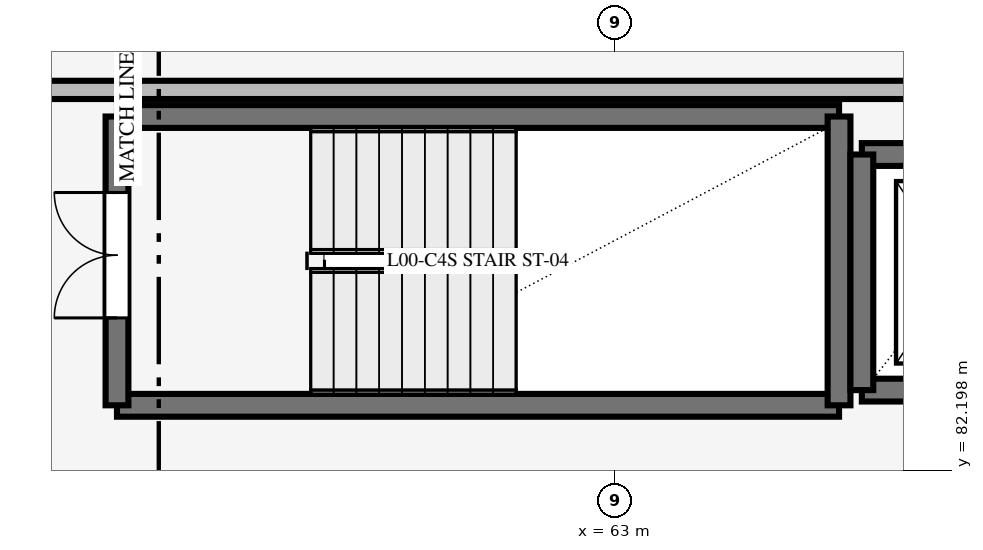
"""IFC4 building model, lengths in metres.
Left out: names, types, materials, properties, quantities, classifications, styles, units other than length and angle.
Written with IfcOpenShell. Run it as: python <this file> out.ifc"""

import sys

from ifc_helpers import new_model, si_unit, direction, frame, frame_2d, origin, place, context, subcontext, project, spatial, rectangle, extrude, element, fill, save


model = new_model("IFC4")
c1 = context("Model", 3, precision=1e-05, world=origin(), true_north=direction((0.0, 1.0)))
c2 = subcontext(c1, "Body", "Model", "MODEL_VIEW")
j1 = project(units=[si_unit("LENGTHUNIT", "METRE"), si_unit("PLANEANGLEUNIT", "RADIAN")], contexts=[c1])
p1 = place(None, origin())
s1 = spatial("IfcSite", under=j1, at=p1, CompositionType="ELEMENT")
p2 = place(p1, origin())
s2 = spatial("IfcBuilding", under=s1, at=p2, CompositionType="ELEMENT")
p3 = place(p2, origin())
s3 = spatial("IfcBuildingStorey", under=s2, at=p3, CompositionType="ELEMENT", Elevation=0.0)
for number, where, z_axis, x_axis in (
    (1, (65.95, 83.05, 0.0), (0.0, 0.0, 1.0), (-1.0, 0.0, 0.0)),
    (2, (56.45, 86.85, 0.0), (0.0, 0.0, 1.0), (1.0, 0.0, 0.0)),
):
    element("IfcWall", number, at=place(p3, frame(where, z_axis=z_axis, x_axis=x_axis)), inside=s3, PredefinedType="SHEAR", context=c2, shape_type="SweptSolid", body=[
        extrude(rectangle(XDim=9.5, YDim=0.3, at=frame_2d((4.75, 0.0))), origin(), (0.0, 0.0, 1.0), 6.0),
    ])
p4 = place(p3, frame((56.45, 83.05, 0.0), z_axis=(0.0, 0.0, 1.0), x_axis=(0.0, 1.0, 0.0)))
e3 = element("IfcWall", 3, at=p4, inside=s3, PredefinedType="SHEAR", context=c2, shape_type="SweptSolid", body=[
    extrude(rectangle(XDim=3.8, YDim=0.3, at=frame_2d((1.9, 0.0))), origin(), (0.0, 0.0, 1.0), 6.0),
])
p5 = place(p4, frame((1.15, 0.0, 0.0)))
e4 = element("IfcOpeningElement", 4, at=p5, cuts=e3, PredefinedType="OPENING", context=c2, shape_type="SweptSolid", body=[
    extrude(rectangle(XDim=1.65, YDim=2.2, at=frame_2d((0.825, 1.1))), frame((0.0, 0.16, 0.0), z_axis=(0.0, -1.0, 0.0), x_axis=(1.0, 0.0, 0.0)), (0.0, 0.0, 1.0), 0.32),
])
p6 = place(p3, frame((65.95, 83.05, 0.0), z_axis=(0.0, 0.0, 1.0), x_axis=(0.0, 1.0, 0.0)))
e5 = element("IfcWall", 5, at=p6, inside=s3, PredefinedType="SHEAR", context=c2, shape_type="SweptSolid", body=[
    extrude(rectangle(XDim=3.8, YDim=0.3, at=frame_2d((1.9, 0.0))), origin(), (0.0, 0.0, 1.0), 6.0),
])
p7 = place(p3, frame((66.25, 83.25, 0.0), z_axis=(0.0, 0.0, 1.0), x_axis=(1.0, 0.0, 0.0)))
e6 = element("IfcWall", 6, at=p7, inside=s3, PredefinedType="SHEAR", context=c2, shape_type="SweptSolid", body=[
    extrude(rectangle(XDim=2.5, YDim=0.3, at=frame_2d((1.25, 0.0))), origin(), (0.0, 0.0, 1.0), 5.66),
])
p8 = place(p7, frame((0.6, 0.0, 0.0)))
e7 = element("IfcOpeningElement", 7, at=p8, cuts=e6, PredefinedType="OPENING", context=c2, shape_type="SweptSolid", body=[
    extrude(rectangle(XDim=1.3, YDim=2.2, at=frame_2d((0.65, 1.1))), frame((0.0, 0.16, 0.0), z_axis=(0.0, -1.0, 0.0), x_axis=(1.0, 0.0, 0.0)), (0.0, 0.0, 1.0), 0.32),
])
p9 = place(p3, frame((66.25, 86.35, 0.0), z_axis=(0.0, 0.0, 1.0), x_axis=(1.0, 0.0, 0.0)))
e8 = element("IfcWall", 8, at=p9, inside=s3, PredefinedType="SHEAR", context=c2, shape_type="SweptSolid", body=[
    extrude(rectangle(XDim=2.5, YDim=0.3, at=frame_2d((1.25, 0.0))), origin(), (0.0, 0.0, 1.0), 5.66),
])
p10 = place(p3, frame((66.25, 83.25, 0.0), z_axis=(0.0, 0.0, 1.0), x_axis=(0.0, 1.0, 0.0)))
e9 = element("IfcWall", 9, at=p10, inside=s3, PredefinedType="SHEAR", context=c2, shape_type="SweptSolid", body=[
    extrude(rectangle(XDim=3.1, YDim=0.3, at=frame_2d((1.55, 0.0))), origin(), (0.0, 0.0, 1.0), 5.66),
])
p11 = place(p3, frame((54.8, 87.2, 0.0), z_axis=(0.0, 0.0, 1.0), x_axis=(1.0, 0.0, 0.0)))
e10 = element("IfcWall", 10, at=p11, inside=s3, PredefinedType="STANDARD", context=c2, shape_type="SweptSolid", body=[
    extrude(rectangle(XDim=15.8, YDim=0.24, at=frame_2d((7.9, 0.0))), origin(), (0.0, 0.0, 1.0), 3.05),
])
p12 = place(p5, origin())
e11 = element("IfcDoor", 11, at=p12, inside=s3, OperationType="DOUBLE_DOOR_SINGLE_SWING", PredefinedType="DOOR", context=c2, shape_type="SweptSolid", body=[
    extrude(rectangle(XDim=1.65, YDim=2.2, at=frame_2d((0.825, 1.1))), frame((0.0, 0.025, 0.0), z_axis=(0.0, -1.0, 0.0), x_axis=(1.0, 0.0, 0.0)), (0.0, 0.0, 1.0), 0.05),
])
fill(e4, e11)
save(model, sys.argv[1])
